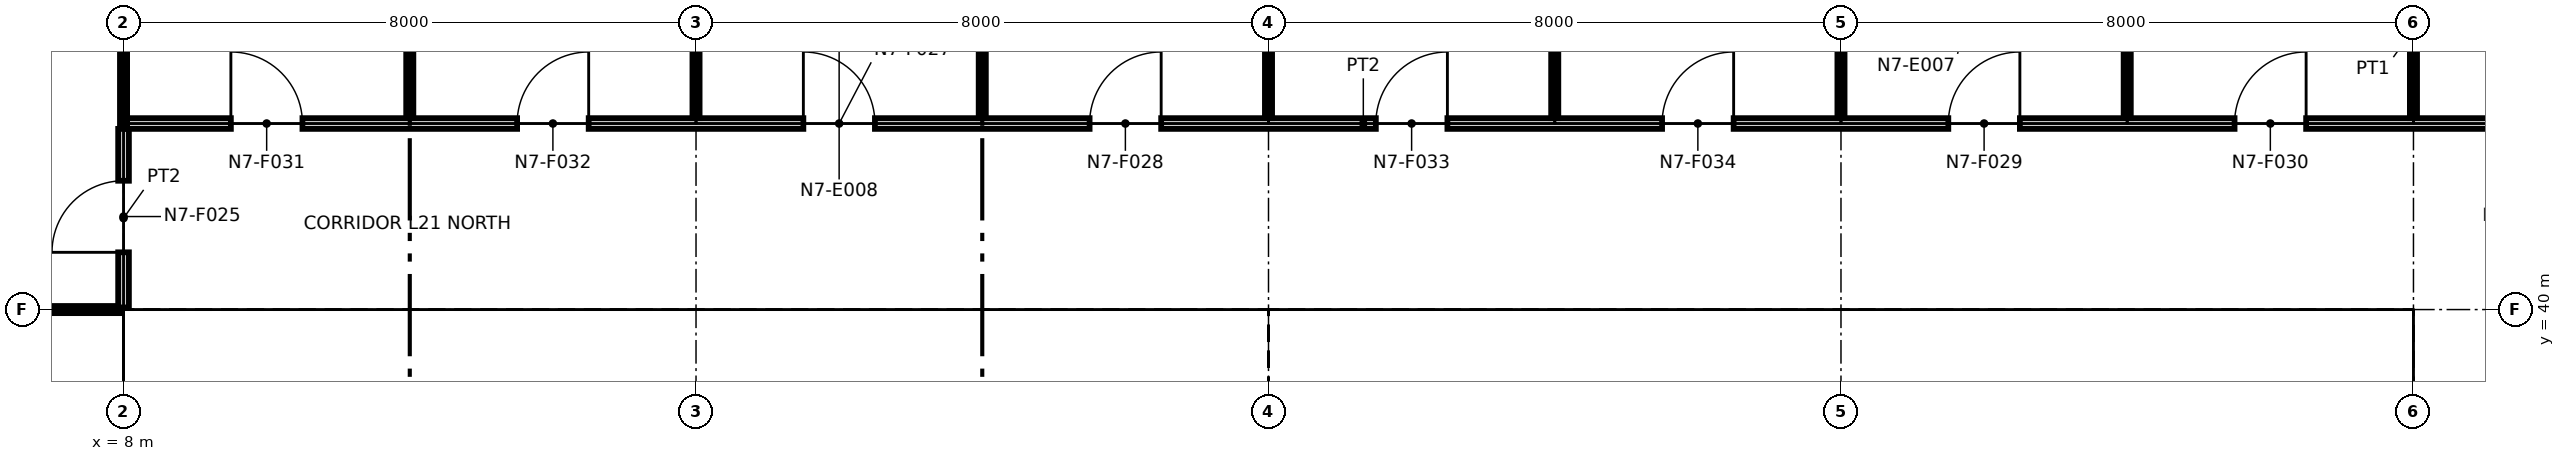
"""IFC4 building model, lengths in metres.
Left out: names, types, materials, properties, quantities, classifications, styles, units other than length and angle.
Written with IfcOpenShell. Run it as: python <this file> out.ifc"""

import sys

from ifc_helpers import new_model, si_unit, direction, frame, frame_2d, origin, origin_2d, place, context, subcontext, project, spatial, polyline, rectangle, i_section, outline, extrude, element, fill, save


model = new_model("IFC4")
c1 = context("Model", 3, precision=1e-05, world=origin(), true_north=direction((0.0, 1.0)))
c2 = subcontext(c1, "Body", "Model", "MODEL_VIEW")
j1 = project(units=[si_unit("LENGTHUNIT", "METRE"), si_unit("PLANEANGLEUNIT", "RADIAN")], contexts=[c1])
p1 = place(None, origin())
s1 = spatial("IfcSite", under=j1, at=p1, CompositionType="ELEMENT")
p2 = place(p1, origin())
s2 = spatial("IfcBuilding", under=s1, at=p2, CompositionType="ELEMENT")
p3 = place(p2, frame((0.0, 0.0, 109.6)))
s3 = spatial("IfcBuildingStorey", under=s2, at=p3, CompositionType="ELEMENT", Elevation=109.6)
for number, where, z_axis, x_axis in (
    (1, (8.0, 40.0, 0.0), (0.0, 0.0, 1.0), (1.0, 0.0, 0.0)),
    (2, (16.0, 40.0, 0.0), (0.0, 0.0, 1.0), (1.0, 0.0, 0.0)),
):
    element("IfcColumn", number, at=place(p3, frame(where, z_axis=z_axis, x_axis=x_axis)), inside=s3, PredefinedType="COLUMN", context=c2, shape_type="SweptSolid", body=[
        extrude(i_section(OverallWidth=0.373, OverallDepth=0.368, WebThickness=0.015, FlangeThickness=0.024, at=origin_2d()), origin(), (0.0, 0.0, 1.0), 4.15),
    ])
p4 = place(p3, frame((24.0, 40.0, 0.0), z_axis=(0.0, 0.0, 1.0), x_axis=(1.0, 0.0, 0.0)))
e3 = element("IfcColumn", 3, at=p4, inside=s3, PredefinedType="COLUMN", context=c2, shape_type="SweptSolid", body=[
    extrude(i_section(OverallWidth=0.394, OverallDepth=0.376, WebThickness=0.017, FlangeThickness=0.028, at=origin_2d()), origin(), (0.0, 0.0, 1.0), 4.15),
])
for number, where, z_axis, x_axis in (
    (4, (32.0, 40.0, 0.0), (0.0, 0.0, 1.0), (1.0, 0.0, 0.0)),
    (5, (40.0, 40.0, 0.0), (0.0, 0.0, 1.0), (1.0, 0.0, 0.0)),
):
    element("IfcColumn", number, at=place(p3, frame(where, z_axis=z_axis, x_axis=x_axis)), inside=s3, PredefinedType="COLUMN", context=c2, shape_type="SweptSolid", body=[
        extrude(i_section(OverallWidth=0.257, OverallDepth=0.363, WebThickness=0.013, FlangeThickness=0.022, at=origin_2d()), origin(), (0.0, 0.0, 1.0), 4.15),
    ])
p5 = place(p3, frame((8.75, 32.85, 0.0), z_axis=(0.0, 0.0, 1.0), x_axis=(0.0, 1.0, 0.0)))
e6 = element("IfcWall", 6, at=p5, inside=s3, PredefinedType="PARTITIONING", context=c2, shape_type="SweptSolid", body=[
    extrude(outline(polyline([(0.0, 0.0), (6.3, 0.0), (6.3, 4.15), (3.269, 4.15), (3.268, 3.542), (3.032, 3.542), (3.031, 4.15), (0.0, 4.15), (0.0, 0.0)])), frame((0.0, 0.1, 0.0), z_axis=(0.0, -1.0, 0.0), x_axis=(1.0, 0.0, 0.0)), (0.0, 0.0, 1.0), 0.2),
])
p6 = place(p3, frame((8.65, 39.25, 0.0), z_axis=(0.0, 0.0, 1.0), x_axis=(1.0, 0.0, 0.0)))
e7 = element("IfcWall", 7, at=p6, inside=s3, PredefinedType="PARTITIONING", context=c2, shape_type="SweptSolid", body=[
    extrude(outline(polyline([(0.0, 0.0), (14.7, 0.0), (14.7, 4.15), (7.489, 4.15), (7.488, 3.382), (7.212, 3.382), (7.211, 4.15), (0.0, 4.15), (0.0, 0.0)])), frame((0.0, 0.1, 0.0), z_axis=(0.0, -1.0, 0.0), x_axis=(1.0, 0.0, 0.0)), (0.0, 0.0, 1.0), 0.2),
])
for number, where, z_axis, x_axis in (
    (8, (11.2, 36.6, 0.0), (0.0, 0.0, 1.0), (0.0, 1.0, 0.0)),
    (9, (13.5, 36.6, 0.0), (0.0, 0.0, 1.0), (0.0, 1.0, 0.0)),
):
    element("IfcWall", number, at=place(p3, frame(where, z_axis=z_axis, x_axis=x_axis)), inside=s3, PredefinedType="PARTITIONING", context=c2, shape_type="SweptSolid", body=[
        extrude(rectangle(XDim=2.55, YDim=0.2, at=frame_2d((1.275, 0.0))), origin(), (0.0, 0.0, 1.0), 4.15),
    ])
p7 = place(p3, frame((16.0, 36.6, 0.0), z_axis=(0.0, 0.0, 1.0), x_axis=(0.0, 1.0, 0.0)))
e10 = element("IfcWall", 10, at=p7, inside=s3, PredefinedType="PARTITIONING", context=c2, shape_type="SweptSolid", body=[
    extrude(rectangle(XDim=2.55, YDim=0.6, at=frame_2d((1.275, 0.0))), origin(), (0.0, 0.0, 1.0), 3.382),
])
for number, where, z_axis, x_axis in (
    (11, (19.2, 32.85, 0.0), (0.0, 0.0, 1.0), (0.0, 1.0, 0.0)),
    (12, (23.25, 32.85, 0.0), (0.0, 0.0, 1.0), (0.0, 1.0, 0.0)),
):
    element("IfcWall", number, at=place(p3, frame(where, z_axis=z_axis, x_axis=x_axis)), inside=s3, PredefinedType="PARTITIONING", context=c2, shape_type="SweptSolid", body=[
        extrude(rectangle(XDim=6.3, YDim=0.2, at=frame_2d((3.15, 0.0))), origin(), (0.0, 0.0, 1.0), 4.15),
    ])
p8 = place(p3, frame((24.75, 32.85, 0.0), z_axis=(0.0, 0.0, 1.0), x_axis=(0.0, 1.0, 0.0)))
e13 = element("IfcWall", 13, at=p8, inside=s3, PredefinedType="PARTITIONING", context=c2, shape_type="SweptSolid", body=[
    extrude(outline(polyline([(0.0, 0.0), (6.3, 0.0), (6.3, 4.15), (3.269, 4.15), (3.268, 3.542), (3.032, 3.542), (3.031, 4.15), (0.0, 4.15), (0.0, 0.0)])), frame((0.0, 0.1, 0.0), z_axis=(0.0, -1.0, 0.0), x_axis=(1.0, 0.0, 0.0)), (0.0, 0.0, 1.0), 0.2),
])
p9 = place(p3, frame((24.65, 39.25, 0.0), z_axis=(0.0, 0.0, 1.0), x_axis=(1.0, 0.0, 0.0)))
e14 = element("IfcWall", 14, at=p9, inside=s3, PredefinedType="PARTITIONING", context=c2, shape_type="SweptSolid", body=[
    extrude(outline(polyline([(0.0, 0.0), (14.7, 0.0), (14.7, 4.15), (7.489, 4.15), (7.488, 3.382), (7.212, 3.382), (7.211, 4.15), (0.0, 4.15), (0.0, 0.0)])), frame((0.0, 0.1, 0.0), z_axis=(0.0, -1.0, 0.0), x_axis=(1.0, 0.0, 0.0)), (0.0, 0.0, 1.0), 0.2),
])
for number, where, z_axis, x_axis in (
    (15, (27.2, 36.6, 0.0), (0.0, 0.0, 1.0), (0.0, 1.0, 0.0)),
    (16, (29.5, 36.6, 0.0), (0.0, 0.0, 1.0), (0.0, 1.0, 0.0)),
):
    element("IfcWall", number, at=place(p3, frame(where, z_axis=z_axis, x_axis=x_axis)), inside=s3, PredefinedType="PARTITIONING", context=c2, shape_type="SweptSolid", body=[
        extrude(rectangle(XDim=2.55, YDim=0.2, at=frame_2d((1.275, 0.0))), origin(), (0.0, 0.0, 1.0), 4.15),
    ])
p10 = place(p3, frame((32.0, 36.6, 0.0), z_axis=(0.0, 0.0, 1.0), x_axis=(0.0, 1.0, 0.0)))
e17 = element("IfcWall", 17, at=p10, inside=s3, PredefinedType="PARTITIONING", context=c2, shape_type="SweptSolid", body=[
    extrude(rectangle(XDim=2.55, YDim=0.6, at=frame_2d((1.275, 0.0))), origin(), (0.0, 0.0, 1.0), 3.382),
])
for number, where, z_axis, x_axis in (
    (18, (35.6, 32.85, 0.0), (0.0, 0.0, 1.0), (0.0, 1.0, 0.0)),
    (19, (39.25, 32.85, 0.0), (0.0, 0.0, 1.0), (0.0, 1.0, 0.0)),
):
    element("IfcWall", number, at=place(p3, frame(where, z_axis=z_axis, x_axis=x_axis)), inside=s3, PredefinedType="PARTITIONING", context=c2, shape_type="SweptSolid", body=[
        extrude(rectangle(XDim=6.3, YDim=0.2, at=frame_2d((3.15, 0.0))), origin(), (0.0, 0.0, 1.0), 4.15),
    ])
p11 = place(p3, frame((2.83, 40.0, 0.0), z_axis=(0.0, 0.0, 1.0), x_axis=(1.0, 0.0, 0.0)))
e20 = element("IfcWall", 20, at=p11, inside=s3, PredefinedType="PARTITIONING", context=c2, shape_type="SweptSolid", body=[
    extrude(rectangle(XDim=5.14, YDim=0.1, at=frame_2d((2.57, 0.0))), origin(), (0.0, 0.0, 1.0), 3.194),
])
p12 = place(p3, frame((8.0, 40.03, 0.0), z_axis=(0.0, 0.0, 1.0), x_axis=(0.0, 1.0, 0.0)))
e21 = element("IfcWall", 21, at=p12, inside=s3, PredefinedType="PARTITIONING", context=c2, shape_type="SweptSolid", body=[
    extrude(rectangle(XDim=2.495, YDim=0.15, at=frame_2d((1.248, 0.0))), origin(), (0.0, 0.0, 1.0), 3.194),
])
p13 = place(p12, frame((0.77, 0.0, 0.0)))
e22 = element("IfcOpeningElement", 22, at=p13, cuts=e21, PredefinedType="OPENING", context=c2, shape_type="SweptSolid", body=[
    extrude(rectangle(XDim=1.0, YDim=2.1, at=frame_2d((0.5, 1.05))), frame((0.0, 0.085, 0.0), z_axis=(0.0, -1.0, 0.0), x_axis=(1.0, 0.0, 0.0)), (0.0, 0.0, 1.0), 0.17),
])
p14 = place(p3, frame((8.05, 42.6, 0.0), z_axis=(0.0, 0.0, 1.0), x_axis=(1.0, 0.0, 0.0)))
e23 = element("IfcWall", 23, at=p14, inside=s3, PredefinedType="PARTITIONING", context=c2, shape_type="SweptSolid", body=[
    extrude(rectangle(XDim=34.55, YDim=0.15, at=frame_2d((17.275, 0.0))), origin(), (0.0, 0.0, 1.0), 3.194),
])
p15 = place(p14, frame((9.45, 0.0, 0.0)))
e24 = element("IfcOpeningElement", 24, at=p15, cuts=e23, PredefinedType="OPENING", context=c2, shape_type="SweptSolid", body=[
    extrude(rectangle(XDim=1.0, YDim=2.1, at=frame_2d((0.5, 1.05))), frame((0.0, 0.085, 0.0), z_axis=(0.0, -1.0, 0.0), x_axis=(1.0, 0.0, 0.0)), (0.0, 0.0, 1.0), 0.17),
])
p16 = place(p14, frame((13.45, 0.0, 0.0)))
e25 = element("IfcOpeningElement", 25, at=p16, cuts=e23, PredefinedType="OPENING", context=c2, shape_type="SweptSolid", body=[
    extrude(rectangle(XDim=1.0, YDim=2.1, at=frame_2d((0.5, 1.05))), frame((0.0, 0.085, 0.0), z_axis=(0.0, -1.0, 0.0), x_axis=(1.0, 0.0, 0.0)), (0.0, 0.0, 1.0), 0.17),
])
p17 = place(p14, frame((25.45, 0.0, 0.0)))
e26 = element("IfcOpeningElement", 26, at=p17, cuts=e23, PredefinedType="OPENING", context=c2, shape_type="SweptSolid", body=[
    extrude(rectangle(XDim=1.0, YDim=2.1, at=frame_2d((0.5, 1.05))), frame((0.0, 0.085, 0.0), z_axis=(0.0, -1.0, 0.0), x_axis=(1.0, 0.0, 0.0)), (0.0, 0.0, 1.0), 0.17),
])
p18 = place(p14, frame((29.45, 0.0, 0.0)))
e27 = element("IfcOpeningElement", 27, at=p18, cuts=e23, PredefinedType="OPENING", context=c2, shape_type="SweptSolid", body=[
    extrude(rectangle(XDim=1.0, YDim=2.1, at=frame_2d((0.5, 1.05))), frame((0.0, 0.085, 0.0), z_axis=(0.0, -1.0, 0.0), x_axis=(1.0, 0.0, 0.0)), (0.0, 0.0, 1.0), 0.17),
])
p19 = place(p14, frame((1.45, 0.0, 0.0)))
e28 = element("IfcOpeningElement", 28, at=p19, cuts=e23, PredefinedType="OPENING", context=c2, shape_type="SweptSolid", body=[
    extrude(rectangle(XDim=1.0, YDim=2.1, at=frame_2d((0.5, 1.05))), frame((0.0, 0.085, 0.0), z_axis=(0.0, -1.0, 0.0), x_axis=(1.0, 0.0, 0.0)), (0.0, 0.0, 1.0), 0.17),
])
p20 = place(p14, frame((5.45, 0.0, 0.0)))
e29 = element("IfcOpeningElement", 29, at=p20, cuts=e23, PredefinedType="OPENING", context=c2, shape_type="SweptSolid", body=[
    extrude(rectangle(XDim=1.0, YDim=2.1, at=frame_2d((0.5, 1.05))), frame((0.0, 0.085, 0.0), z_axis=(0.0, -1.0, 0.0), x_axis=(1.0, 0.0, 0.0)), (0.0, 0.0, 1.0), 0.17),
])
p21 = place(p14, frame((17.45, 0.0, 0.0)))
e30 = element("IfcOpeningElement", 30, at=p21, cuts=e23, PredefinedType="OPENING", context=c2, shape_type="SweptSolid", body=[
    extrude(rectangle(XDim=1.0, YDim=2.1, at=frame_2d((0.5, 1.05))), frame((0.0, 0.085, 0.0), z_axis=(0.0, -1.0, 0.0), x_axis=(1.0, 0.0, 0.0)), (0.0, 0.0, 1.0), 0.17),
])
p22 = place(p14, frame((21.45, 0.0, 0.0)))
e31 = element("IfcOpeningElement", 31, at=p22, cuts=e23, PredefinedType="OPENING", context=c2, shape_type="SweptSolid", body=[
    extrude(rectangle(XDim=1.0, YDim=2.1, at=frame_2d((0.5, 1.05))), frame((0.0, 0.085, 0.0), z_axis=(0.0, -1.0, 0.0), x_axis=(1.0, 0.0, 0.0)), (0.0, 0.0, 1.0), 0.17),
])
p23 = place(p3, frame((8.0, 42.6, 0.0), z_axis=(0.0, 0.0, 1.0), x_axis=(0.0, 1.0, 0.0)))
e32 = element("IfcWall", 32, at=p23, inside=s3, PredefinedType="PARTITIONING", context=c2, shape_type="SweptSolid", body=[
    extrude(rectangle(XDim=5.27, YDim=0.1, at=frame_2d((2.635, 0.0))), origin(), (0.0, 0.0, 1.0), 3.194),
])
p24 = place(p3, frame((12.0, 42.675, 0.0), z_axis=(0.0, 0.0, 1.0), x_axis=(0.0, 1.0, 0.0)))
e33 = element("IfcWall", 33, at=p24, inside=s3, PredefinedType="PARTITIONING", context=c2, shape_type="SweptSolid", body=[
    extrude(rectangle(XDim=5.195, YDim=0.1, at=frame_2d((2.598, 0.0))), origin(), (0.0, 0.0, 1.0), 3.194),
])
for number, where, z_axis, x_axis in (
    (34, (16.0, 42.675, 0.0), (0.0, 0.0, 1.0), (0.0, 1.0, 0.0)),
    (35, (20.0, 42.675, 0.0), (0.0, 0.0, 1.0), (0.0, 1.0, 0.0)),
    (36, (24.0, 42.675, 0.0), (0.0, 0.0, 1.0), (0.0, 1.0, 0.0)),
):
    element("IfcWall", number, at=place(p3, frame(where, z_axis=z_axis, x_axis=x_axis)), inside=s3, PredefinedType="PARTITIONING", context=c2, shape_type="SweptSolid", body=[
        extrude(rectangle(XDim=2.495, YDim=0.1, at=frame_2d((1.248, 0.0))), origin(), (0.0, 0.0, 1.0), 3.194),
    ])
p25 = place(p3, frame((28.0, 42.675, 0.0), z_axis=(0.0, 0.0, 1.0), x_axis=(0.0, 1.0, 0.0)))
e37 = element("IfcWall", 37, at=p25, inside=s3, PredefinedType="PARTITIONING", context=c2, shape_type="SweptSolid", body=[
    extrude(rectangle(XDim=5.195, YDim=0.1, at=frame_2d((2.598, 0.0))), origin(), (0.0, 0.0, 1.0), 3.194),
])
for number, where, z_axis, x_axis in (
    (38, (32.0, 42.675, 0.0), (0.0, 0.0, 1.0), (0.0, 1.0, 0.0)),
    (39, (36.0, 42.675, 0.0), (0.0, 0.0, 1.0), (0.0, 1.0, 0.0)),
    (40, (40.0, 42.675, 0.0), (0.0, 0.0, 1.0), (0.0, 1.0, 0.0)),
):
    element("IfcWall", number, at=place(p3, frame(where, z_axis=z_axis, x_axis=x_axis)), inside=s3, PredefinedType="PARTITIONING", context=c2, shape_type="SweptSolid", body=[
        extrude(rectangle(XDim=2.495, YDim=0.1, at=frame_2d((1.248, 0.0))), origin(), (0.0, 0.0, 1.0), 3.194),
    ])
p26 = place(p13, origin())
e41 = element("IfcDoor", 41, at=p26, inside=s3, OperationType="SINGLE_SWING_LEFT", PredefinedType="DOOR", context=c2, shape_type="SweptSolid", body=[
    extrude(rectangle(XDim=1.0, YDim=2.1, at=frame_2d((0.5, 1.05))), frame((0.0, 0.025, 0.0), z_axis=(0.0, -1.0, 0.0), x_axis=(1.0, 0.0, 0.0)), (0.0, 0.0, 1.0), 0.05),
])
fill(e22, e41)
p27 = place(p15, origin())
e42 = element("IfcDoor", 42, at=p27, inside=s3, OperationType="SINGLE_SWING_LEFT", PredefinedType="DOOR", context=c2, shape_type="SweptSolid", body=[
    extrude(rectangle(XDim=1.0, YDim=2.1, at=frame_2d((0.5, 1.05))), frame((0.0, 0.025, 0.0), z_axis=(0.0, -1.0, 0.0), x_axis=(1.0, 0.0, 0.0)), (0.0, 0.0, 1.0), 0.05),
])
fill(e24, e42)
p28 = place(p16, origin())
e43 = element("IfcDoor", 43, at=p28, inside=s3, OperationType="SINGLE_SWING_RIGHT", PredefinedType="DOOR", context=c2, shape_type="SweptSolid", body=[
    extrude(rectangle(XDim=1.0, YDim=2.1, at=frame_2d((0.5, 1.05))), frame((0.0, 0.025, 0.0), z_axis=(0.0, -1.0, 0.0), x_axis=(1.0, 0.0, 0.0)), (0.0, 0.0, 1.0), 0.05),
])
fill(e25, e43)
p29 = place(p17, origin())
e44 = element("IfcDoor", 44, at=p29, inside=s3, OperationType="SINGLE_SWING_RIGHT", PredefinedType="DOOR", context=c2, shape_type="SweptSolid", body=[
    extrude(rectangle(XDim=1.0, YDim=2.1, at=frame_2d((0.5, 1.05))), frame((0.0, 0.025, 0.0), z_axis=(0.0, -1.0, 0.0), x_axis=(1.0, 0.0, 0.0)), (0.0, 0.0, 1.0), 0.05),
])
fill(e26, e44)
p30 = place(p18, origin())
e45 = element("IfcDoor", 45, at=p30, inside=s3, OperationType="SINGLE_SWING_RIGHT", PredefinedType="DOOR", context=c2, shape_type="SweptSolid", body=[
    extrude(rectangle(XDim=1.0, YDim=2.1, at=frame_2d((0.5, 1.05))), frame((0.0, 0.025, 0.0), z_axis=(0.0, -1.0, 0.0), x_axis=(1.0, 0.0, 0.0)), (0.0, 0.0, 1.0), 0.05),
])
fill(e27, e45)
p31 = place(p19, origin())
e46 = element("IfcDoor", 46, at=p31, inside=s3, OperationType="SINGLE_SWING_LEFT", PredefinedType="DOOR", context=c2, shape_type="SweptSolid", body=[
    extrude(rectangle(XDim=1.0, YDim=2.1, at=frame_2d((0.5, 1.05))), frame((0.0, 0.025, 0.0), z_axis=(0.0, -1.0, 0.0), x_axis=(1.0, 0.0, 0.0)), (0.0, 0.0, 1.0), 0.05),
])
fill(e28, e46)
p32 = place(p20, origin())
e47 = element("IfcDoor", 47, at=p32, inside=s3, OperationType="SINGLE_SWING_RIGHT", PredefinedType="DOOR", context=c2, shape_type="SweptSolid", body=[
    extrude(rectangle(XDim=1.0, YDim=2.1, at=frame_2d((0.5, 1.05))), frame((0.0, 0.025, 0.0), z_axis=(0.0, -1.0, 0.0), x_axis=(1.0, 0.0, 0.0)), (0.0, 0.0, 1.0), 0.05),
])
fill(e29, e47)
p33 = place(p21, origin())
e48 = element("IfcDoor", 48, at=p33, inside=s3, OperationType="SINGLE_SWING_RIGHT", PredefinedType="DOOR", context=c2, shape_type="SweptSolid", body=[
    extrude(rectangle(XDim=1.0, YDim=2.1, at=frame_2d((0.5, 1.05))), frame((0.0, 0.025, 0.0), z_axis=(0.0, -1.0, 0.0), x_axis=(1.0, 0.0, 0.0)), (0.0, 0.0, 1.0), 0.05),
])
fill(e30, e48)
p34 = place(p22, origin())
e49 = element("IfcDoor", 49, at=p34, inside=s3, OperationType="SINGLE_SWING_RIGHT", PredefinedType="DOOR", context=c2, shape_type="SweptSolid", body=[
    extrude(rectangle(XDim=1.0, YDim=2.1, at=frame_2d((0.5, 1.05))), frame((0.0, 0.025, 0.0), z_axis=(0.0, -1.0, 0.0), x_axis=(1.0, 0.0, 0.0)), (0.0, 0.0, 1.0), 0.05),
])
fill(e31, e49)
save(model, sys.argv[1])
